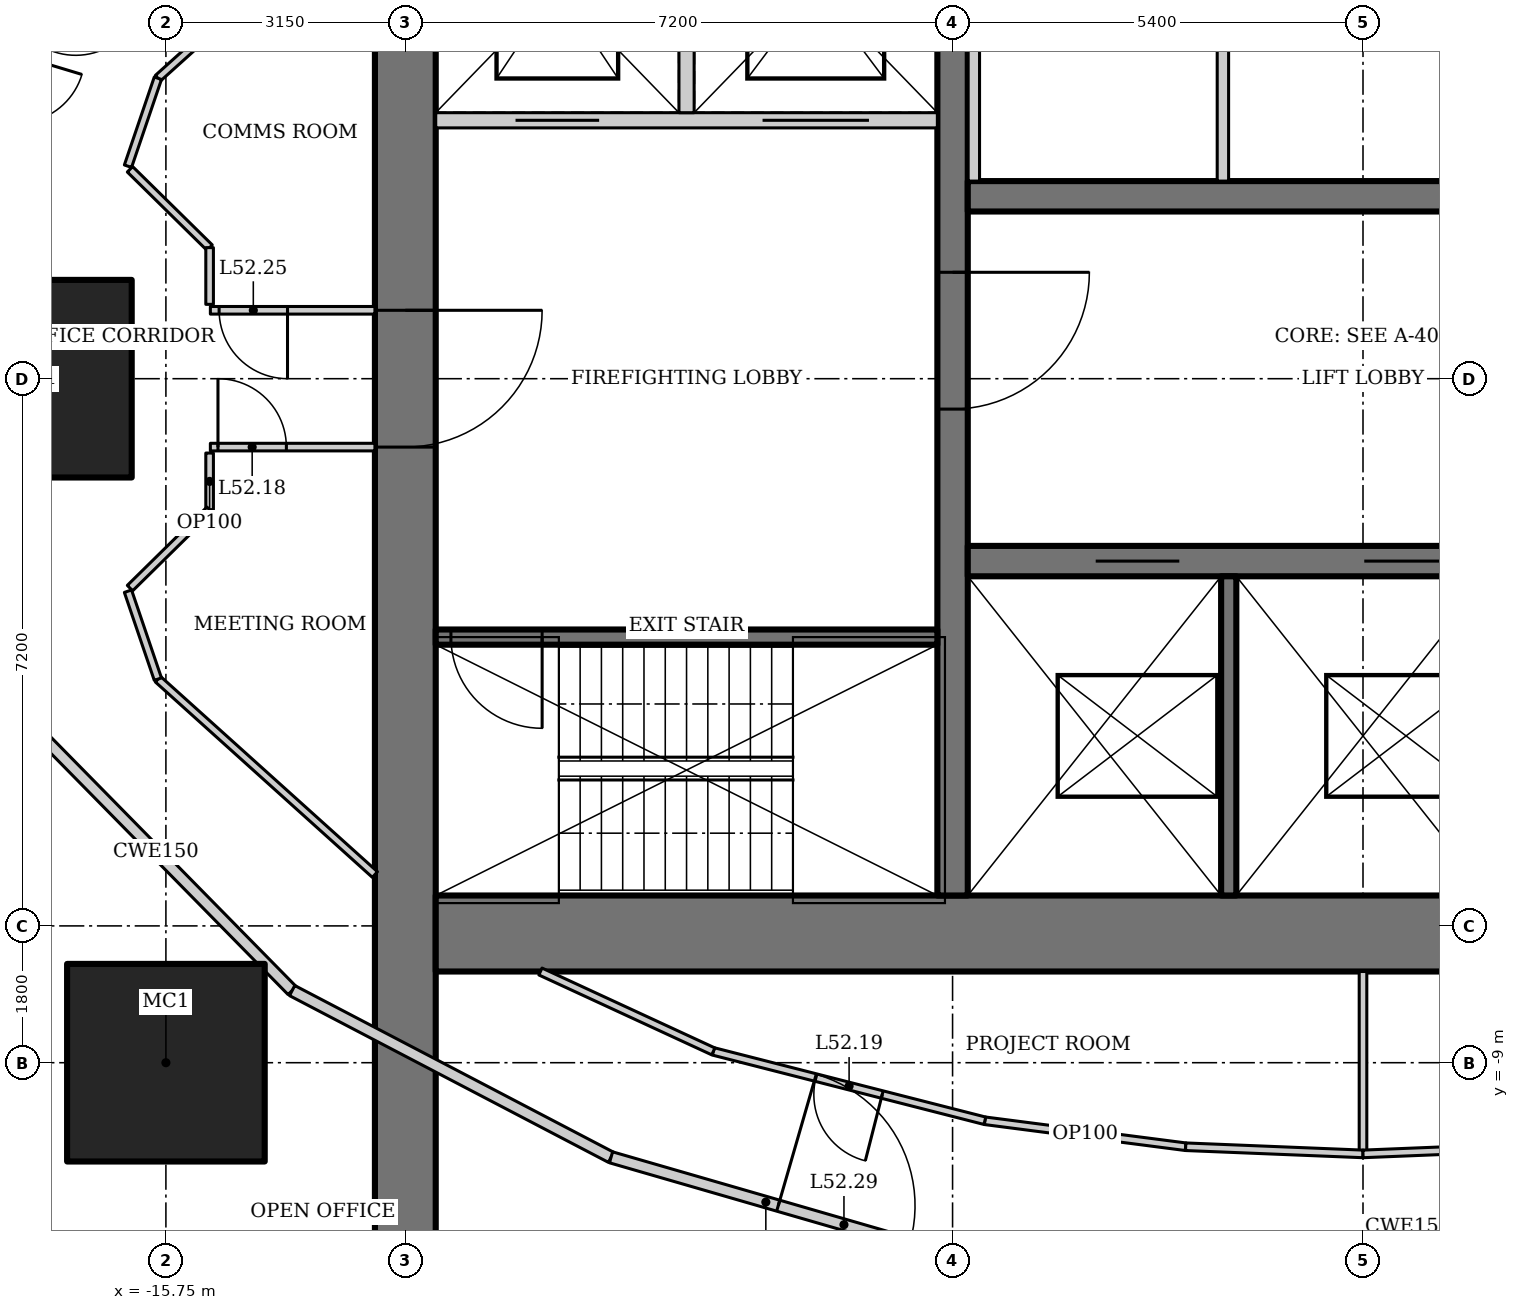
"""IFC4 building model, lengths in metres.
Left out: names, types, materials, properties, quantities, classifications, styles, units other than length and angle.
Written with IfcOpenShell. Run it as: python <this file> out.ifc"""

import sys

from ifc_helpers import new_model, si_unit, direction, frame, frame_2d, origin, origin_2d, place, context, subcontext, project, spatial, rectangle, hollow_rectangle, extrude, element, fill, save


model = new_model("IFC4")
c1 = context("Model", 3, precision=1e-05, world=origin(), true_north=direction((0.0, 1.0)))
c2 = subcontext(c1, "Body", "Model", "MODEL_VIEW")
j1 = project(units=[si_unit("LENGTHUNIT", "METRE"), si_unit("PLANEANGLEUNIT", "RADIAN")], contexts=[c1])
p1 = place(None, origin())
s1 = spatial("IfcSite", under=j1, at=p1, CompositionType="ELEMENT")
p2 = place(p1, origin())
s2 = spatial("IfcBuilding", under=s1, at=p2, CompositionType="ELEMENT")
p3 = place(p2, frame((0.0, 0.0, 224.2)))
s3 = spatial("IfcBuildingStorey", under=s2, at=p3, CompositionType="ELEMENT", Elevation=224.2)
for number, where, z_axis, x_axis in (
    (1, (-17.5, 0.0, 0.0), (0.0, 0.0, 1.0), (1.0, 0.0, 0.0)),
    (2, (-15.75, -9.0, 0.0), (0.0, 0.0, 1.0), (1.0, 0.0, 0.0)),
):
    element("IfcColumn", number, at=place(p3, frame(where, z_axis=z_axis, x_axis=x_axis)), inside=s3, PredefinedType="COLUMN", context=c2, shape_type="SweptSolid", body=[
        extrude(hollow_rectangle(XDim=2.6, YDim=2.6, WallThickness=0.13, at=origin_2d()), origin(), (0.0, 0.0, 1.0), 4.2),
    ])
p4 = place(p3, frame((-12.6, 13.0, 0.0), z_axis=(0.0, 0.0, 1.0), x_axis=(0.0, -1.0, 0.0)))
e3 = element("IfcWall", 3, at=p4, inside=s3, PredefinedType="SHEAR", context=c2, shape_type="SweptSolid", body=[
    extrude(rectangle(XDim=26.0, YDim=0.8, at=frame_2d((13.0, 0.0))), origin(), (0.0, 0.0, 1.0), 4.2),
])
p5 = place(p4, frame((12.1, 0.0, 0.0)))
e4 = element("IfcOpeningElement", 4, at=p5, cuts=e3, PredefinedType="OPENING", context=c2, shape_type="SweptSolid", body=[
    extrude(rectangle(XDim=1.8, YDim=2.1, at=frame_2d((0.9, 1.05))), frame((0.0, 0.41, 0.0), z_axis=(0.0, -1.0, 0.0), x_axis=(1.0, 0.0, 0.0)), (0.0, 0.0, 1.0), 0.82),
])
p6 = place(p3, frame((-12.2, -7.3, 0.0), z_axis=(0.0, 0.0, 1.0), x_axis=(1.0, 0.0, 0.0)))
e5 = element("IfcWall", 5, at=p6, inside=s3, PredefinedType="SHEAR", context=c2, shape_type="SweptSolid", body=[
    extrude(rectangle(XDim=24.4, YDim=1.0, at=frame_2d((12.2, 0.0))), origin(), (0.0, 0.0, 1.0), 4.2),
])
p7 = place(p3, frame((-5.4, 7.8, 0.0), z_axis=(0.0, 0.0, 1.0), x_axis=(0.0, -1.0, 0.0)))
e6 = element("IfcWall", 6, at=p7, inside=s3, PredefinedType="SHEAR", context=c2, shape_type="SweptSolid", body=[
    extrude(rectangle(XDim=14.6, YDim=0.4, at=frame_2d((7.3, 0.0))), origin(), (0.0, 0.0, 1.0), 4.2),
])
p8 = place(p7, frame((6.4, 0.0, 0.0)))
e7 = element("IfcOpeningElement", 7, at=p8, cuts=e6, PredefinedType="OPENING", context=c2, shape_type="SweptSolid", body=[
    extrude(rectangle(XDim=1.8, YDim=2.1, at=frame_2d((0.9, 1.05))), frame((0.0, 0.21, 0.0), z_axis=(0.0, -1.0, 0.0), x_axis=(1.0, 0.0, 0.0)), (0.0, 0.0, 1.0), 0.42),
])
p9 = place(p3, frame((-5.2, -2.4, 0.0), z_axis=(0.0, 0.0, 1.0), x_axis=(1.0, 0.0, 0.0)))
e8 = element("IfcWall", 8, at=p9, inside=s3, PredefinedType="SHEAR", context=c2, shape_type="SweptSolid", body=[
    extrude(rectangle(XDim=10.4, YDim=0.4, at=frame_2d((5.2, 0.0))), origin(), (0.0, 0.0, 1.0), 4.2),
])
p10 = place(p9, frame((1.683, 0.0, 0.0)))
e9 = element("IfcOpeningElement", 9, at=p10, cuts=e8, PredefinedType="OPENING", context=c2, shape_type="SweptSolid", body=[
    extrude(rectangle(XDim=1.1, YDim=2.2, at=frame_2d((0.55, 1.1))), frame((0.0, 0.21, 0.0), z_axis=(0.0, -1.0, 0.0), x_axis=(1.0, 0.0, 0.0)), (0.0, 0.0, 1.0), 0.42),
])
p11 = place(p9, frame((5.217, 0.0, 0.0)))
e10 = element("IfcOpeningElement", 10, at=p11, cuts=e8, PredefinedType="OPENING", context=c2, shape_type="SweptSolid", body=[
    extrude(rectangle(XDim=1.1, YDim=2.2, at=frame_2d((0.55, 1.1))), frame((0.0, 0.21, 0.0), z_axis=(0.0, -1.0, 0.0), x_axis=(1.0, 0.0, 0.0)), (0.0, 0.0, 1.0), 0.42),
])
p12 = place(p9, frame((8.75, 0.0, 0.0)))
e11 = element("IfcOpeningElement", 11, at=p12, cuts=e8, PredefinedType="OPENING", context=c2, shape_type="SweptSolid", body=[
    extrude(rectangle(XDim=1.1, YDim=2.2, at=frame_2d((0.55, 1.1))), frame((0.0, 0.21, 0.0), z_axis=(0.0, -1.0, 0.0), x_axis=(1.0, 0.0, 0.0)), (0.0, 0.0, 1.0), 0.42),
])
p13 = place(p3, frame((-1.767, -2.6, 0.0), z_axis=(0.0, 0.0, 1.0), x_axis=(0.0, -1.0, 0.0)))
e12 = element("IfcWall", 12, at=p13, inside=s3, PredefinedType="SOLIDWALL", context=c2, shape_type="SweptSolid", body=[
    extrude(rectangle(XDim=4.2, YDim=0.2, at=frame_2d((2.1, 0.0))), origin(), (0.0, 0.0, 1.0), 4.2),
])
p14 = place(p3, frame((5.2, 2.4, 0.0), z_axis=(0.0, 0.0, 1.0), x_axis=(-1.0, 0.0, 0.0)))
e13 = element("IfcWall", 13, at=p14, inside=s3, PredefinedType="SHEAR", context=c2, shape_type="SweptSolid", body=[
    extrude(rectangle(XDim=10.4, YDim=0.4, at=frame_2d((5.2, 0.0))), origin(), (0.0, 0.0, 1.0), 4.2),
])
p15 = place(p3, frame((-5.6, -3.4, 0.0), z_axis=(0.0, 0.0, 1.0), x_axis=(-1.0, 0.0, 0.0)))
e14 = element("IfcWall", 14, at=p15, inside=s3, PredefinedType="SHEAR", context=c2, shape_type="SweptSolid", body=[
    extrude(rectangle(XDim=6.6, YDim=0.2, at=frame_2d((3.3, 0.0))), origin(), (0.0, 0.0, 1.0), 4.2),
])
p16 = place(p15, frame((5.2, 0.0, 0.0)))
e15 = element("IfcOpeningElement", 15, at=p16, cuts=e14, PredefinedType="OPENING", context=c2, shape_type="SweptSolid", body=[
    extrude(rectangle(XDim=1.2, YDim=2.1, at=frame_2d((0.6, 1.05))), frame((0.0, 0.11, 0.0), z_axis=(0.0, -1.0, 0.0), x_axis=(1.0, 0.0, 0.0)), (0.0, 0.0, 1.0), 0.22),
])
p17 = place(p3, frame((-12.2, 3.4, 0.0), z_axis=(0.0, 0.0, 1.0), x_axis=(1.0, 0.0, 0.0)))
e16 = element("IfcWall", 16, at=p17, inside=s3, PredefinedType="SOLIDWALL", context=c2, shape_type="SweptSolid", body=[
    extrude(rectangle(XDim=6.6, YDim=0.2, at=frame_2d((3.3, 0.0))), origin(), (0.0, 0.0, 1.0), 4.2),
])
p18 = place(p17, frame((1.05, 0.0, 0.0)))
e17 = element("IfcOpeningElement", 17, at=p18, cuts=e16, PredefinedType="OPENING", context=c2, shape_type="SweptSolid", body=[
    extrude(rectangle(XDim=1.1, YDim=2.2, at=frame_2d((0.55, 1.1))), frame((0.0, 0.11, 0.0), z_axis=(0.0, -1.0, 0.0), x_axis=(1.0, 0.0, 0.0)), (0.0, 0.0, 1.0), 0.22),
])
p19 = place(p17, frame((4.3, 0.0, 0.0)))
e18 = element("IfcOpeningElement", 18, at=p19, cuts=e16, PredefinedType="OPENING", context=c2, shape_type="SweptSolid", body=[
    extrude(rectangle(XDim=1.4, YDim=2.2, at=frame_2d((0.7, 1.1))), frame((0.0, 0.11, 0.0), z_axis=(0.0, -1.0, 0.0), x_axis=(1.0, 0.0, 0.0)), (0.0, 0.0, 1.0), 0.22),
])
p20 = place(p3, frame((-8.9, 3.5, 0.0), z_axis=(0.0, 0.0, 1.0), x_axis=(0.0, 1.0, 0.0)))
e19 = element("IfcWall", 19, at=p20, inside=s3, PredefinedType="SOLIDWALL", context=c2, shape_type="SweptSolid", body=[
    extrude(rectangle(XDim=3.3, YDim=0.2, at=frame_2d((1.65, 0.0))), origin(), (0.0, 0.0, 1.0), 4.2),
])
p21 = place(p3, frame((-17.673, -4.406, 0.0), z_axis=(0.0, 0.0, 1.0), x_axis=(0.701111216625, -0.713051934941, 0.0)))
e20 = element("IfcWall", 20, at=p21, inside=s3, PredefinedType="PARTITIONING", context=c2, shape_type="SweptSolid", body=[
    extrude(rectangle(XDim=5.112, YDim=0.15, at=frame_2d((2.556, 0.0))), origin(), (0.0, 0.0, 1.0), 4.05),
])
p22 = place(p3, frame((-14.089, -8.051, 0.0), z_axis=(0.0, 0.0, 1.0), x_axis=(0.886174439647, -0.463351769735, 0.0)))
e21 = element("IfcWall", 21, at=p22, inside=s3, PredefinedType="PARTITIONING", context=c2, shape_type="SweptSolid", body=[
    extrude(rectangle(XDim=4.735, YDim=0.15, at=frame_2d((2.367, 0.0))), origin(), (0.0, 0.0, 1.0), 4.05),
])
p23 = place(p3, frame((-9.893, -10.245, 0.0), z_axis=(0.0, 0.0, 1.0), x_axis=(0.960614838378, -0.27788330696, 0.0)))
e22 = element("IfcWall", 22, at=p23, inside=s3, PredefinedType="PARTITIONING", context=c2, shape_type="SweptSolid", body=[
    extrude(rectangle(XDim=4.24, YDim=0.15, at=frame_2d((2.12, 0.0))), origin(), (0.0, 0.0, 1.0), 4.05),
])
p24 = place(p23, frame((2.29, 0.0, 0.0)))
e23 = element("IfcOpeningElement", 23, at=p24, cuts=e22, PredefinedType="OPENING", context=c2, shape_type="SweptSolid", body=[
    extrude(rectangle(XDim=1.8, YDim=2.1, at=frame_2d((0.9, 1.05))), frame((0.0, 0.085, 0.0), z_axis=(0.0, -1.0, 0.0), x_axis=(1.0, 0.0, 0.0)), (0.0, 0.0, 1.0), 0.17),
])
for number, where, z_axis, x_axis in (
    (24, (-5.12, 2.6, 0.0), (0.0, 0.0, 1.0), (0.0, 1.0, 0.0)),
    (25, (-1.843, 2.6, 0.0), (0.0, 0.0, 1.0), (0.0, 1.0, 0.0)),
):
    element("IfcWall", number, at=place(p3, frame(where, z_axis=z_axis, x_axis=x_axis)), inside=s3, PredefinedType="SOLIDWALL", context=c2, shape_type="SweptSolid", body=[
        extrude(rectangle(XDim=4.4, YDim=0.15, at=frame_2d((2.2, 0.0))), origin(), (0.0, 0.0, 1.0), 4.05),
    ])
p25 = place(p3, frame((-13.0, -6.524, 0.0), z_axis=(0.0, 0.0, 1.0), x_axis=(-0.743177243228, 0.669094601046, 0.0)))
e26 = element("IfcWall", 26, at=p25, inside=s3, PredefinedType="PARTITIONING", context=c2, shape_type="SweptSolid", body=[
    extrude(rectangle(XDim=3.843, YDim=0.1, at=frame_2d((1.921, 0.0))), origin(), (0.0, 0.0, 1.0), 4.05),
])
p26 = place(p3, frame((-2.333, -10.106, 0.0), z_axis=(0.0, 0.0, 1.0), x_axis=(-0.99173579163, 0.128296997624, 0.0)))
e27 = element("IfcWall", 27, at=p26, inside=s3, PredefinedType="PARTITIONING", context=c2, shape_type="SweptSolid", body=[
    extrude(rectangle(XDim=2.664, YDim=0.1, at=frame_2d((1.332, 0.0))), origin(), (0.0, 0.0, 1.0), 4.05),
])
p27 = place(p3, frame((-4.975, -9.764, 0.0), z_axis=(0.0, 0.0, 1.0), x_axis=(-0.968887312542, 0.247502273921, 0.0)))
e28 = element("IfcWall", 28, at=p27, inside=s3, PredefinedType="PARTITIONING", context=c2, shape_type="SweptSolid", body=[
    extrude(rectangle(XDim=3.687, YDim=0.1, at=frame_2d((1.844, 0.0))), origin(), (0.0, 0.0, 1.0), 4.05),
])
p28 = place(p27, frame((1.394, 0.0, 0.0)))
e29 = element("IfcOpeningElement", 29, at=p28, cuts=e28, PredefinedType="OPENING", context=c2, shape_type="SweptSolid", body=[
    extrude(rectangle(XDim=0.9, YDim=2.1, at=frame_2d((0.45, 1.05))), frame((0.0, 0.06, 0.0), z_axis=(0.0, -1.0, 0.0), x_axis=(1.0, 0.0, 0.0)), (0.0, 0.0, 1.0), 0.12),
])
p29 = place(p3, frame((-8.548, -8.851, 0.0), z_axis=(0.0, 0.0, 1.0), x_axis=(-0.907759689292, 0.419490579748, 0.0)))
e30 = element("IfcWall", 30, at=p29, inside=s3, PredefinedType="PARTITIONING", context=c2, shape_type="SweptSolid", body=[
    extrude(rectangle(XDim=2.506, YDim=0.1, at=frame_2d((1.253, 0.0))), origin(), (0.0, 0.0, 1.0), 4.05),
])
p30 = place(p3, frame((0.0, -7.8, 0.0), z_axis=(0.0, 0.0, 1.0), x_axis=(0.0, -1.0, 0.0)))
e31 = element("IfcWall", 31, at=p30, inside=s3, PredefinedType="PARTITIONING", context=c2, shape_type="SweptSolid", body=[
    extrude(rectangle(XDim=2.4, YDim=0.1, at=frame_2d((1.2, 0.0))), origin(), (0.0, 0.0, 1.0), 3.644),
])
for number, where, z_axis, x_axis in (
    (32, (0.0, -10.2, 0.0), (0.0, 0.0, 1.0), (-0.999, 0.04, 0.0)),
    (33, (2.333, -10.106, 0.0), (0.0, 0.0, 1.0), (-0.999, -0.04, 0.0)),
):
    element("IfcWall", number, at=place(p3, frame(where, z_axis=z_axis, x_axis=x_axis)), inside=s3, PredefinedType="PARTITIONING", context=c2, shape_type="SweptSolid", body=[
        extrude(rectangle(XDim=2.335, YDim=0.1, at=frame_2d((1.167, 0.0))), origin(), (0.0, 0.0, 1.0), 4.05),
    ])
p31 = place(p3, frame((-15.856, 3.953, 0.0), z_axis=(0.0, 0.0, 1.0), x_axis=(0.743177243228, 0.669094601046, 0.0)))
e34 = element("IfcWall", 34, at=p31, inside=s3, PredefinedType="PARTITIONING", context=c2, shape_type="SweptSolid", body=[
    extrude(rectangle(XDim=3.843, YDim=0.1, at=frame_2d((1.921, 0.0))), origin(), (0.0, 0.0, 1.0), 4.05),
])
p32 = place(p3, frame((-15.856, -3.953, 0.0), z_axis=(0.0, 0.0, 1.0), x_axis=(-0.321913473529, 0.946769093053, 0.0)))
e35 = element("IfcWall", 35, at=p32, inside=s3, PredefinedType="PARTITIONING", context=c2, shape_type="SweptSolid", body=[
    extrude(rectangle(XDim=1.223, YDim=0.1, at=frame_2d((0.611, 0.0))), origin(), (0.0, 0.0, 1.0), 4.05),
])
p33 = place(p3, frame((-15.165, -0.9, 0.0), z_axis=(0.0, 0.0, 1.0), x_axis=(1.0, 0.0, 0.0)))
e36 = element("IfcWall", 36, at=p33, inside=s3, PredefinedType="PARTITIONING", context=c2, shape_type="SweptSolid", body=[
    extrude(rectangle(XDim=2.165, YDim=0.1, at=frame_2d((1.083, 0.0))), origin(), (0.0, 0.0, 1.0), 4.05),
])
p34 = place(p33, frame((0.1, 0.0, 0.0)))
e37 = element("IfcOpeningElement", 37, at=p34, cuts=e36, PredefinedType="OPENING", context=c2, shape_type="SweptSolid", body=[
    extrude(rectangle(XDim=0.9, YDim=2.1, at=frame_2d((0.45, 1.05))), frame((0.0, 0.06, 0.0), z_axis=(0.0, -1.0, 0.0), x_axis=(1.0, 0.0, 0.0)), (0.0, 0.0, 1.0), 0.12),
])
p35 = place(p3, frame((-13.0, 0.9, 0.0), z_axis=(0.0, 0.0, 1.0), x_axis=(-1.0, 0.0, 0.0)))
e38 = element("IfcWall", 38, at=p35, inside=s3, PredefinedType="PARTITIONING", context=c2, shape_type="SweptSolid", body=[
    extrude(rectangle(XDim=2.165, YDim=0.1, at=frame_2d((1.083, 0.0))), origin(), (0.0, 0.0, 1.0), 4.05),
])
p36 = place(p35, frame((1.15, 0.0, 0.0)))
e39 = element("IfcOpeningElement", 39, at=p36, cuts=e38, PredefinedType="OPENING", context=c2, shape_type="SweptSolid", body=[
    extrude(rectangle(XDim=0.9, YDim=2.1, at=frame_2d((0.45, 1.05))), frame((0.0, 0.06, 0.0), z_axis=(0.0, -1.0, 0.0), x_axis=(1.0, 0.0, 0.0)), (0.0, 0.0, 1.0), 0.12),
])
p37 = place(p3, frame((-16.249, 2.796, 0.0), z_axis=(0.0, 0.0, 1.0), x_axis=(0.321913473529, 0.946769093053, 0.0)))
e40 = element("IfcWall", 40, at=p37, inside=s3, PredefinedType="PARTITIONING", context=c2, shape_type="SweptSolid", body=[
    extrude(rectangle(XDim=1.223, YDim=0.1, at=frame_2d((0.611, 0.0))), origin(), (0.0, 0.0, 1.0), 4.05),
])
p38 = place(p3, frame((-15.175, -0.978, 0.0), z_axis=(0.0, 0.0, 1.0), x_axis=(0.0, -1.0, 0.0)))
e41 = element("IfcWall", 41, at=p38, inside=s3, PredefinedType="PARTITIONING", context=c2, shape_type="SweptSolid", body=[
    extrude(rectangle(XDim=0.746, YDim=0.1, at=frame_2d((0.373, 0.0))), origin(), (0.0, 0.0, 1.0), 4.05),
])
for number, where, z_axis, x_axis in (
    (42, (-15.175, -1.725, 0.0), (0.0, 0.0, 1.0), (-0.713, -0.701, 0.0)),
    (43, (-16.223, 2.755, 0.0), (0.0, 0.0, 1.0), (0.713, -0.701, 0.0)),
):
    element("IfcWall", number, at=place(p3, frame(where, z_axis=z_axis, x_axis=x_axis)), inside=s3, PredefinedType="PARTITIONING", context=c2, shape_type="SweptSolid", body=[
        extrude(rectangle(XDim=1.469, YDim=0.1, at=frame_2d((0.735, 0.0))), origin(), (0.0, 0.0, 1.0), 4.05),
    ])
p39 = place(p3, frame((-15.175, 1.725, 0.0), z_axis=(0.0, 0.0, 1.0), x_axis=(0.0, -1.0, 0.0)))
e44 = element("IfcWall", 44, at=p39, inside=s3, PredefinedType="PARTITIONING", context=c2, shape_type="SweptSolid", body=[
    extrude(rectangle(XDim=0.746, YDim=0.1, at=frame_2d((0.373, 0.0))), origin(), (0.0, 0.0, 1.0), 4.05),
])
p40 = place(p8, origin())
e45 = element("IfcDoor", 45, at=p40, inside=s3, OperationType="DOUBLE_DOOR_DOUBLE_SWING", PredefinedType="DOOR", context=c2, shape_type="SweptSolid", body=[
    extrude(rectangle(XDim=1.8, YDim=2.1, at=frame_2d((0.9, 1.05))), frame((0.0, 0.025, 0.0), z_axis=(0.0, -1.0, 0.0), x_axis=(1.0, 0.0, 0.0)), (0.0, 0.0, 1.0), 0.05),
])
fill(e7, e45)
p41 = place(p16, origin())
e46 = element("IfcDoor", 46, at=p41, inside=s3, OperationType="SINGLE_SWING_RIGHT", PredefinedType="DOOR", context=c2, shape_type="SweptSolid", body=[
    extrude(rectangle(XDim=1.2, YDim=2.1, at=frame_2d((0.6, 1.05))), frame((0.0, 0.025, 0.0), z_axis=(0.0, -1.0, 0.0), x_axis=(1.0, 0.0, 0.0)), (0.0, 0.0, 1.0), 0.05),
])
fill(e15, e46)
p42 = place(p5, origin())
e47 = element("IfcDoor", 47, at=p42, inside=s3, OperationType="DOUBLE_DOOR_DOUBLE_SWING", PredefinedType="DOOR", context=c2, shape_type="SweptSolid", body=[
    extrude(rectangle(XDim=1.8, YDim=2.1, at=frame_2d((0.9, 1.05))), frame((0.0, 0.025, 0.0), z_axis=(0.0, -1.0, 0.0), x_axis=(1.0, 0.0, 0.0)), (0.0, 0.0, 1.0), 0.05),
])
fill(e4, e47)
p43 = place(p10, origin())
e48 = element("IfcDoor", 48, at=p43, inside=s3, OperationType="DOUBLE_DOOR_SLIDING", PredefinedType="DOOR", context=c2, shape_type="SweptSolid", body=[
    extrude(rectangle(XDim=1.1, YDim=2.2, at=frame_2d((0.55, 1.1))), frame((0.0, 0.025, 0.0), z_axis=(0.0, -1.0, 0.0), x_axis=(1.0, 0.0, 0.0)), (0.0, 0.0, 1.0), 0.05),
])
fill(e9, e48)
p44 = place(p11, origin())
e49 = element("IfcDoor", 49, at=p44, inside=s3, OperationType="DOUBLE_DOOR_SLIDING", PredefinedType="DOOR", context=c2, shape_type="SweptSolid", body=[
    extrude(rectangle(XDim=1.1, YDim=2.2, at=frame_2d((0.55, 1.1))), frame((0.0, 0.025, 0.0), z_axis=(0.0, -1.0, 0.0), x_axis=(1.0, 0.0, 0.0)), (0.0, 0.0, 1.0), 0.05),
])
fill(e10, e49)
p45 = place(p18, origin())
e50 = element("IfcDoor", 50, at=p45, inside=s3, OperationType="DOUBLE_DOOR_SLIDING", PredefinedType="DOOR", context=c2, shape_type="SweptSolid", body=[
    extrude(rectangle(XDim=1.1, YDim=2.2, at=frame_2d((0.55, 1.1))), frame((0.0, 0.025, 0.0), z_axis=(0.0, -1.0, 0.0), x_axis=(1.0, 0.0, 0.0)), (0.0, 0.0, 1.0), 0.05),
])
fill(e17, e50)
p46 = place(p19, origin())
e51 = element("IfcDoor", 51, at=p46, inside=s3, OperationType="DOUBLE_DOOR_SLIDING", PredefinedType="DOOR", context=c2, shape_type="SweptSolid", body=[
    extrude(rectangle(XDim=1.4, YDim=2.2, at=frame_2d((0.7, 1.1))), frame((0.0, 0.025, 0.0), z_axis=(0.0, -1.0, 0.0), x_axis=(1.0, 0.0, 0.0)), (0.0, 0.0, 1.0), 0.05),
])
fill(e18, e51)
p47 = place(p34, origin())
e52 = element("IfcDoor", 52, at=p47, inside=s3, OperationType="SINGLE_SWING_LEFT", PredefinedType="DOOR", context=c2, shape_type="SweptSolid", body=[
    extrude(rectangle(XDim=0.9, YDim=2.1, at=frame_2d((0.45, 1.05))), frame((0.0, 0.025, 0.0), z_axis=(0.0, -1.0, 0.0), x_axis=(1.0, 0.0, 0.0)), (0.0, 0.0, 1.0), 0.05),
])
fill(e37, e52)
p48 = place(p28, origin())
e53 = element("IfcDoor", 53, at=p48, inside=s3, OperationType="SINGLE_SWING_LEFT", PredefinedType="DOOR", context=c2, shape_type="SweptSolid", body=[
    extrude(rectangle(XDim=0.9, YDim=2.1, at=frame_2d((0.45, 1.05))), frame((0.0, 0.025, 0.0), z_axis=(0.0, -1.0, 0.0), x_axis=(1.0, 0.0, 0.0)), (0.0, 0.0, 1.0), 0.05),
])
fill(e29, e53)
p49 = place(p36, origin())
e54 = element("IfcDoor", 54, at=p49, inside=s3, OperationType="SINGLE_SWING_LEFT", PredefinedType="DOOR", context=c2, shape_type="SweptSolid", body=[
    extrude(rectangle(XDim=0.9, YDim=2.1, at=frame_2d((0.45, 1.05))), frame((0.0, 0.025, 0.0), z_axis=(0.0, -1.0, 0.0), x_axis=(1.0, 0.0, 0.0)), (0.0, 0.0, 1.0), 0.05),
])
fill(e39, e54)
p50 = place(p24, origin())
e55 = element("IfcDoor", 55, at=p50, inside=s3, OperationType="DOUBLE_DOOR_DOUBLE_SWING", PredefinedType="DOOR", context=c2, shape_type="SweptSolid", body=[
    extrude(rectangle(XDim=1.8, YDim=2.1, at=frame_2d((0.9, 1.05))), frame((0.0, 0.025, 0.0), z_axis=(0.0, -1.0, 0.0), x_axis=(1.0, 0.0, 0.0)), (0.0, 0.0, 1.0), 0.05),
])
fill(e23, e55)
save(model, sys.argv[1])
